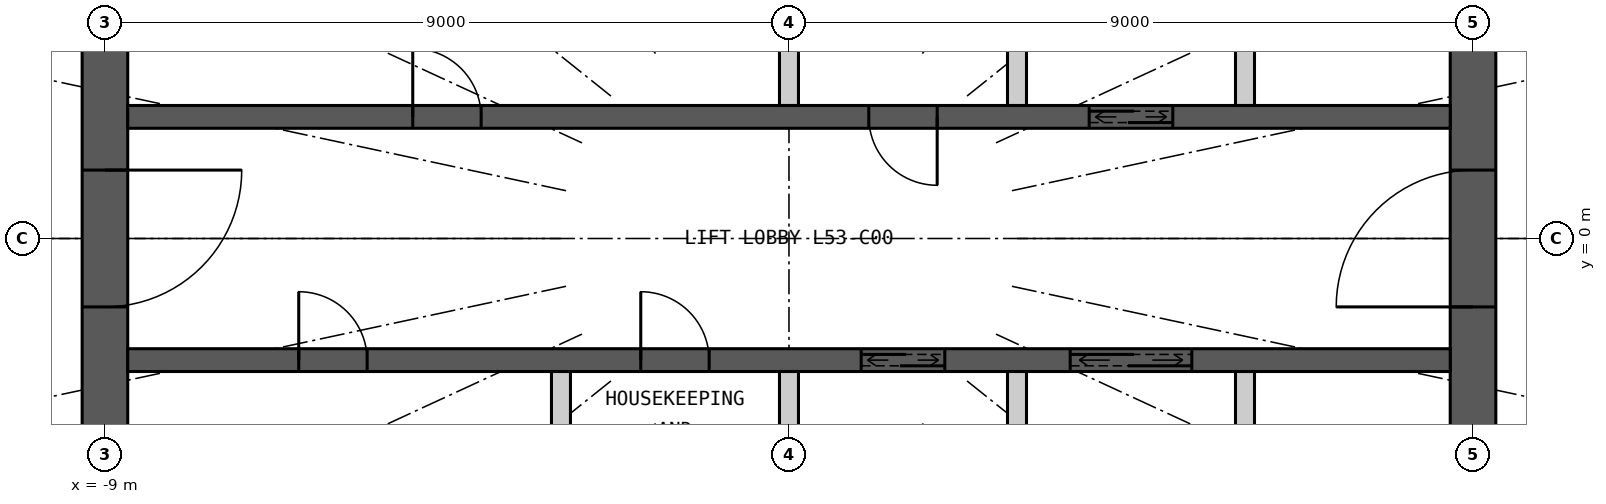
"""IFC4 building model, lengths in metres.
Left out: names, types, materials, properties, quantities, classifications, styles, units other than length and angle.
Written with IfcOpenShell. Run it as: python <this file> out.ifc"""

import sys

from ifc_helpers import new_model, si_unit, direction, frame, frame_2d, origin, place, context, subcontext, project, spatial, rectangle, extrude, element, fill, save


model = new_model("IFC4")
c1 = context("Model", 3, precision=1e-05, world=origin(), true_north=direction((0.0, 1.0)))
c2 = subcontext(c1, "Body", "Model", "MODEL_VIEW")
j1 = project(units=[si_unit("LENGTHUNIT", "METRE"), si_unit("PLANEANGLEUNIT", "RADIAN")], contexts=[c1])
p1 = place(None, origin())
s1 = spatial("IfcSite", under=j1, at=p1, CompositionType="ELEMENT")
p2 = place(p1, origin())
s2 = spatial("IfcBuilding", under=s1, at=p2, CompositionType="ELEMENT")
p3 = place(p2, frame((0.0, 0.0, 199.5)))
s3 = spatial("IfcBuildingStorey", under=s2, at=p3, CompositionType="ELEMENT", Elevation=199.5)
p4 = place(p3, frame((9.0, -7.7, 0.0), z_axis=(0.0, 0.0, 1.0), x_axis=(0.0, 1.0, 0.0)))
e1 = element("IfcWall", 1, at=p4, inside=s3, PredefinedType="SHEAR", context=c2, shape_type="SweptSolid", body=[
    extrude(rectangle(XDim=15.4, YDim=0.6, at=frame_2d((7.7, 0.0))), origin(), (0.0, 0.0, 1.0), 3.3),
])
p5 = place(p4, frame((6.8, 0.0, 0.0)))
e2 = element("IfcOpeningElement", 2, at=p5, cuts=e1, PredefinedType="OPENING", context=c2, shape_type="SweptSolid", body=[
    extrude(rectangle(XDim=1.8, YDim=2.2, at=frame_2d((0.9, 1.1))), frame((0.0, 0.31, 0.0), z_axis=(0.0, -1.0, 0.0), x_axis=(1.0, 0.0, 0.0)), (0.0, 0.0, 1.0), 0.62),
])
p6 = place(p3, frame((-9.0, 7.7, 0.0), z_axis=(0.0, 0.0, 1.0), x_axis=(0.0, -1.0, 0.0)))
e3 = element("IfcWall", 3, at=p6, inside=s3, PredefinedType="SHEAR", context=c2, shape_type="SweptSolid", body=[
    extrude(rectangle(XDim=15.4, YDim=0.6, at=frame_2d((7.7, 0.0))), origin(), (0.0, 0.0, 1.0), 3.3),
])
p7 = place(p6, frame((6.8, 0.0, 0.0)))
e4 = element("IfcOpeningElement", 4, at=p7, cuts=e3, PredefinedType="OPENING", context=c2, shape_type="SweptSolid", body=[
    extrude(rectangle(XDim=1.8, YDim=2.2, at=frame_2d((0.9, 1.1))), frame((0.0, 0.31, 0.0), z_axis=(0.0, -1.0, 0.0), x_axis=(1.0, 0.0, 0.0)), (0.0, 0.0, 1.0), 0.62),
])
p8 = place(p3, frame((-8.7, 1.6, 0.0), z_axis=(0.0, 0.0, 1.0), x_axis=(1.0, 0.0, 0.0)))
e5 = element("IfcWall", 5, at=p8, inside=s3, PredefinedType="SHEAR", context=c2, shape_type="SweptSolid", body=[
    extrude(rectangle(XDim=17.4, YDim=0.3, at=frame_2d((8.7, 0.0))), origin(), (0.0, 0.0, 1.0), 3.3),
])
p9 = place(p8, frame((12.65, 0.0, 0.0)))
e6 = element("IfcOpeningElement", 6, at=p9, cuts=e5, PredefinedType="OPENING", context=c2, shape_type="SweptSolid", body=[
    extrude(rectangle(XDim=1.1, YDim=2.2, at=frame_2d((0.55, 1.1))), frame((0.0, 0.16, 0.0), z_axis=(0.0, -1.0, 0.0), x_axis=(1.0, 0.0, 0.0)), (0.0, 0.0, 1.0), 0.32),
])
p10 = place(p8, frame((3.75, 0.0, 0.0)))
e7 = element("IfcOpeningElement", 7, at=p10, cuts=e5, PredefinedType="OPENING", context=c2, shape_type="SweptSolid", body=[
    extrude(rectangle(XDim=0.9, YDim=2.2, at=frame_2d((0.45, 1.1))), frame((0.0, 0.16, 0.0), z_axis=(0.0, -1.0, 0.0), x_axis=(1.0, 0.0, 0.0)), (0.0, 0.0, 1.0), 0.32),
])
p11 = place(p8, frame((9.75, 0.0, 0.0)))
e8 = element("IfcOpeningElement", 8, at=p11, cuts=e5, PredefinedType="OPENING", context=c2, shape_type="SweptSolid", body=[
    extrude(rectangle(XDim=0.9, YDim=2.2, at=frame_2d((0.45, 1.1))), frame((0.0, 0.16, 0.0), z_axis=(0.0, -1.0, 0.0), x_axis=(1.0, 0.0, 0.0)), (0.0, 0.0, 1.0), 0.32),
])
p12 = place(p3, frame((-8.7, -1.6, 0.0), z_axis=(0.0, 0.0, 1.0), x_axis=(1.0, 0.0, 0.0)))
e9 = element("IfcWall", 9, at=p12, inside=s3, PredefinedType="SHEAR", context=c2, shape_type="SweptSolid", body=[
    extrude(rectangle(XDim=17.4, YDim=0.3, at=frame_2d((8.7, 0.0))), origin(), (0.0, 0.0, 1.0), 3.3),
])
p13 = place(p12, frame((9.65, 0.0, 0.0)))
e10 = element("IfcOpeningElement", 10, at=p13, cuts=e9, PredefinedType="OPENING", context=c2, shape_type="SweptSolid", body=[
    extrude(rectangle(XDim=1.1, YDim=2.2, at=frame_2d((0.55, 1.1))), frame((0.0, 0.16, 0.0), z_axis=(0.0, -1.0, 0.0), x_axis=(1.0, 0.0, 0.0)), (0.0, 0.0, 1.0), 0.32),
])
p14 = place(p12, frame((12.4, 0.0, 0.0)))
e11 = element("IfcOpeningElement", 11, at=p14, cuts=e9, PredefinedType="OPENING", context=c2, shape_type="SweptSolid", body=[
    extrude(rectangle(XDim=1.6, YDim=2.4, at=frame_2d((0.8, 1.2))), frame((0.0, 0.16, 0.0), z_axis=(0.0, -1.0, 0.0), x_axis=(1.0, 0.0, 0.0)), (0.0, 0.0, 1.0), 0.32),
])
p15 = place(p12, frame((2.25, 0.0, 0.0)))
e12 = element("IfcOpeningElement", 12, at=p15, cuts=e9, PredefinedType="OPENING", context=c2, shape_type="SweptSolid", body=[
    extrude(rectangle(XDim=0.9, YDim=2.2, at=frame_2d((0.45, 1.1))), frame((0.0, 0.16, 0.0), z_axis=(0.0, -1.0, 0.0), x_axis=(1.0, 0.0, 0.0)), (0.0, 0.0, 1.0), 0.32),
])
p16 = place(p12, frame((6.75, 0.0, 0.0)))
e13 = element("IfcOpeningElement", 13, at=p16, cuts=e9, PredefinedType="OPENING", context=c2, shape_type="SweptSolid", body=[
    extrude(rectangle(XDim=0.9, YDim=2.2, at=frame_2d((0.45, 1.1))), frame((0.0, 0.16, 0.0), z_axis=(0.0, -1.0, 0.0), x_axis=(1.0, 0.0, 0.0)), (0.0, 0.0, 1.0), 0.32),
])
for number, where, z_axis, x_axis in (
    (14, (0.0, 1.75, 0.0), (0.0, 0.0, 1.0), (0.0, 1.0, 0.0)),
    (15, (3.0, 1.75, 0.0), (0.0, 0.0, 1.0), (0.0, 1.0, 0.0)),
    (16, (6.0, 1.75, 0.0), (0.0, 0.0, 1.0), (0.0, 1.0, 0.0)),
    (17, (-3.0, -4.1, 0.0), (0.0, 0.0, 1.0), (0.0, 1.0, 0.0)),
    (18, (0.0, -4.1, 0.0), (0.0, 0.0, 1.0), (0.0, 1.0, 0.0)),
    (19, (3.0, -4.1, 0.0), (0.0, 0.0, 1.0), (0.0, 1.0, 0.0)),
    (20, (6.0, -4.1, 0.0), (0.0, 0.0, 1.0), (0.0, 1.0, 0.0)),
):
    element("IfcWall", number, at=place(p3, frame(where, z_axis=z_axis, x_axis=x_axis)), inside=s3, PredefinedType="PARTITIONING", context=c2, shape_type="SweptSolid", body=[
        extrude(rectangle(XDim=2.35, YDim=0.25, at=frame_2d((1.175, 0.0))), origin(), (0.0, 0.0, 1.0), 3.3),
    ])
p17 = place(p9, origin())
e21 = element("IfcDoor", 21, at=p17, inside=s3, OperationType="DOUBLE_DOOR_SLIDING", PredefinedType="DOOR", context=c2, shape_type="SweptSolid", body=[
    extrude(rectangle(XDim=1.1, YDim=2.2, at=frame_2d((0.55, 1.1))), frame((0.0, 0.025, 0.0), z_axis=(0.0, -1.0, 0.0), x_axis=(1.0, 0.0, 0.0)), (0.0, 0.0, 1.0), 0.05),
])
fill(e6, e21)
p18 = place(p13, origin())
e22 = element("IfcDoor", 22, at=p18, inside=s3, OperationType="DOUBLE_DOOR_SLIDING", PredefinedType="DOOR", context=c2, shape_type="SweptSolid", body=[
    extrude(rectangle(XDim=1.1, YDim=2.2, at=frame_2d((0.55, 1.1))), frame((0.0, 0.025, 0.0), z_axis=(0.0, -1.0, 0.0), x_axis=(1.0, 0.0, 0.0)), (0.0, 0.0, 1.0), 0.05),
])
fill(e10, e22)
p19 = place(p14, origin())
e23 = element("IfcDoor", 23, at=p19, inside=s3, OperationType="DOUBLE_DOOR_SLIDING", PredefinedType="DOOR", context=c2, shape_type="SweptSolid", body=[
    extrude(rectangle(XDim=1.6, YDim=2.4, at=frame_2d((0.8, 1.2))), frame((0.0, 0.025, 0.0), z_axis=(0.0, -1.0, 0.0), x_axis=(1.0, 0.0, 0.0)), (0.0, 0.0, 1.0), 0.05),
])
fill(e11, e23)
p20 = place(p10, origin())
e24 = element("IfcDoor", 24, at=p20, inside=s3, OperationType="SINGLE_SWING_LEFT", PredefinedType="DOOR", context=c2, shape_type="SweptSolid", body=[
    extrude(rectangle(XDim=0.9, YDim=2.2, at=frame_2d((0.45, 1.1))), frame((0.0, 0.025, 0.0), z_axis=(0.0, -1.0, 0.0), x_axis=(1.0, 0.0, 0.0)), (0.0, 0.0, 1.0), 0.05),
])
fill(e7, e24)
p21 = place(p11, origin())
e25 = element("IfcDoor", 25, at=p21, inside=s3, OperationType="SINGLE_SWING_RIGHT", PredefinedType="DOOR", context=c2, shape_type="SweptSolid", body=[
    extrude(rectangle(XDim=0.9, YDim=2.2, at=frame_2d((0.45, 1.1))), frame((0.0, 0.025, 0.0), z_axis=(0.0, -1.0, 0.0), x_axis=(1.0, 0.0, 0.0)), (0.0, 0.0, 1.0), 0.05),
])
fill(e8, e25)
p22 = place(p15, origin())
e26 = element("IfcDoor", 26, at=p22, inside=s3, OperationType="SINGLE_SWING_LEFT", PredefinedType="DOOR", context=c2, shape_type="SweptSolid", body=[
    extrude(rectangle(XDim=0.9, YDim=2.2, at=frame_2d((0.45, 1.1))), frame((0.0, 0.025, 0.0), z_axis=(0.0, -1.0, 0.0), x_axis=(1.0, 0.0, 0.0)), (0.0, 0.0, 1.0), 0.05),
])
fill(e12, e26)
p23 = place(p16, origin())
e27 = element("IfcDoor", 27, at=p23, inside=s3, OperationType="SINGLE_SWING_LEFT", PredefinedType="DOOR", context=c2, shape_type="SweptSolid", body=[
    extrude(rectangle(XDim=0.9, YDim=2.2, at=frame_2d((0.45, 1.1))), frame((0.0, 0.025, 0.0), z_axis=(0.0, -1.0, 0.0), x_axis=(1.0, 0.0, 0.0)), (0.0, 0.0, 1.0), 0.05),
])
fill(e13, e27)
p24 = place(p5, origin())
e28 = element("IfcDoor", 28, at=p24, inside=s3, OperationType="DOUBLE_DOOR_DOUBLE_SWING", PredefinedType="DOOR", context=c2, shape_type="SweptSolid", body=[
    extrude(rectangle(XDim=1.8, YDim=2.2, at=frame_2d((0.9, 1.1))), frame((0.0, 0.025, 0.0), z_axis=(0.0, -1.0, 0.0), x_axis=(1.0, 0.0, 0.0)), (0.0, 0.0, 1.0), 0.05),
])
fill(e2, e28)
p25 = place(p7, origin())
e29 = element("IfcDoor", 29, at=p25, inside=s3, OperationType="DOUBLE_DOOR_DOUBLE_SWING", PredefinedType="DOOR", context=c2, shape_type="SweptSolid", body=[
    extrude(rectangle(XDim=1.8, YDim=2.2, at=frame_2d((0.9, 1.1))), frame((0.0, 0.025, 0.0), z_axis=(0.0, -1.0, 0.0), x_axis=(1.0, 0.0, 0.0)), (0.0, 0.0, 1.0), 0.05),
])
fill(e4, e29)
save(model, sys.argv[1])
